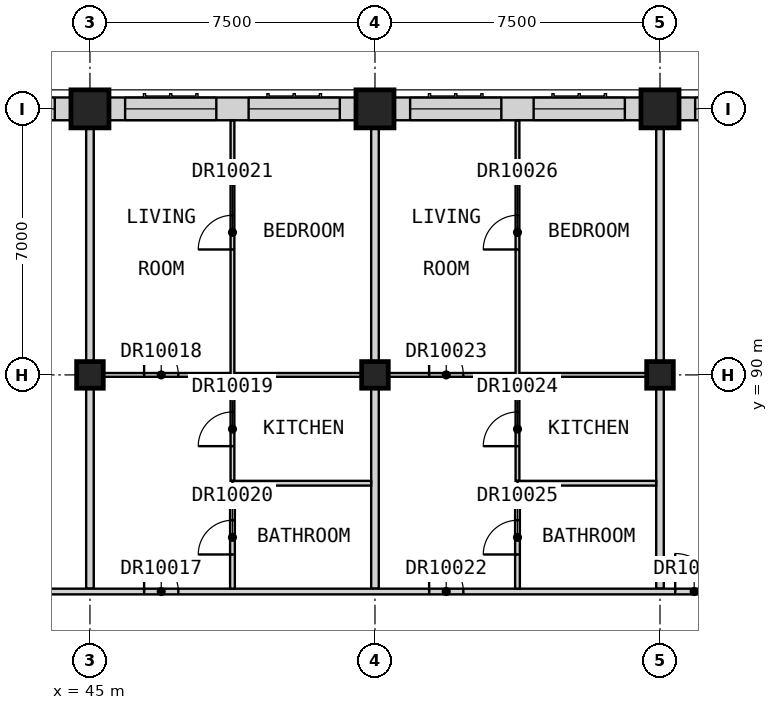
"""IFC4 building model, lengths in metres.
Left out: names, types, materials, properties, quantities, classifications, styles, units other than length and angle.
Written with IfcOpenShell. Run it as: python <this file> out.ifc"""

import sys

from ifc_helpers import new_model, si_unit, direction, frame, frame_2d, origin, origin_2d, place, context, subcontext, project, spatial, rectangle, extrude, element, fill, save


model = new_model("IFC4")
c1 = context("Model", 3, precision=1e-05, world=origin(), true_north=direction((0.0, 1.0)))
c2 = subcontext(c1, "Body", "Model", "MODEL_VIEW")
j1 = project(units=[si_unit("LENGTHUNIT", "METRE"), si_unit("PLANEANGLEUNIT", "RADIAN")], contexts=[c1])
p1 = place(None, origin())
s1 = spatial("IfcSite", under=j1, at=p1, CompositionType="ELEMENT")
p2 = place(p1, origin())
s2 = spatial("IfcBuilding", under=s1, at=p2, CompositionType="ELEMENT")
p3 = place(p2, frame((0.0, 0.0, 283.7)))
s3 = spatial("IfcBuildingStorey", under=s2, at=p3, CompositionType="ELEMENT", Elevation=283.7)
p4 = place(p3, frame((45.0, 90.0, 0.0), z_axis=(0.0, 0.0, 1.0), x_axis=(1.0, 0.0, 0.0)))
e1 = element("IfcColumn", 1, at=p4, inside=s3, PredefinedType="COLUMN", context=c2, shape_type="SweptSolid", body=[
    extrude(rectangle(XDim=0.7, YDim=0.7, at=origin_2d()), origin(), (0.0, 0.0, 1.0), 3.5),
])
p5 = place(p3, frame((45.0, 97.0, 0.0), z_axis=(0.0, 0.0, 1.0), x_axis=(1.0, 0.0, 0.0)))
e2 = element("IfcColumn", 2, at=p5, inside=s3, PredefinedType="COLUMN", context=c2, shape_type="SweptSolid", body=[
    extrude(rectangle(XDim=1.0, YDim=1.0, at=origin_2d()), origin(), (0.0, 0.0, 1.0), 3.5),
])
p6 = place(p3, frame((52.5, 90.0, 0.0), z_axis=(0.0, 0.0, 1.0), x_axis=(1.0, 0.0, 0.0)))
e3 = element("IfcColumn", 3, at=p6, inside=s3, PredefinedType="COLUMN", context=c2, shape_type="SweptSolid", body=[
    extrude(rectangle(XDim=0.7, YDim=0.7, at=origin_2d()), origin(), (0.0, 0.0, 1.0), 3.5),
])
p7 = place(p3, frame((52.5, 97.0, 0.0), z_axis=(0.0, 0.0, 1.0), x_axis=(1.0, 0.0, 0.0)))
e4 = element("IfcColumn", 4, at=p7, inside=s3, PredefinedType="COLUMN", context=c2, shape_type="SweptSolid", body=[
    extrude(rectangle(XDim=1.0, YDim=1.0, at=origin_2d()), origin(), (0.0, 0.0, 1.0), 3.5),
])
p8 = place(p3, frame((60.0, 90.0, 0.0), z_axis=(0.0, 0.0, 1.0), x_axis=(1.0, 0.0, 0.0)))
e5 = element("IfcColumn", 5, at=p8, inside=s3, PredefinedType="COLUMN", context=c2, shape_type="SweptSolid", body=[
    extrude(rectangle(XDim=0.7, YDim=0.7, at=origin_2d()), origin(), (0.0, 0.0, 1.0), 3.5),
])
p9 = place(p3, frame((60.0, 97.0, 0.0), z_axis=(0.0, 0.0, 1.0), x_axis=(1.0, 0.0, 0.0)))
e6 = element("IfcColumn", 6, at=p9, inside=s3, PredefinedType="COLUMN", context=c2, shape_type="SweptSolid", body=[
    extrude(rectangle(XDim=1.0, YDim=1.0, at=origin_2d()), origin(), (0.0, 0.0, 1.0), 3.5),
])
p10 = place(p3, frame((67.0, 97.0, 0.0), z_axis=(0.0, 0.0, 1.0), x_axis=(-1.0, 0.0, 0.0)))
e7 = element("IfcWall", 7, at=p10, inside=s3, PredefinedType="SOLIDWALL", context=c2, shape_type="SweptSolid", body=[
    extrude(rectangle(XDim=6.5, YDim=0.6, at=frame_2d((3.25, 0.0))), origin(), (0.0, 0.0, 1.0), 2.75),
])
p11 = place(p10, frame((3.675, 0.0, 0.8)))
e8 = element("IfcOpeningElement", 8, at=p11, cuts=e7, PredefinedType="OPENING", context=c2, shape_type="SweptSolid", body=[
    extrude(rectangle(XDim=2.4, YDim=1.8, at=frame_2d((1.2, 0.9))), frame((0.0, 0.31, 0.0), z_axis=(0.0, -1.0, 0.0), x_axis=(1.0, 0.0, 0.0)), (0.0, 0.0, 1.0), 0.62),
])
p12 = place(p10, frame((0.425, 0.0, 0.8)))
e9 = element("IfcOpeningElement", 9, at=p12, cuts=e7, PredefinedType="OPENING", context=c2, shape_type="SweptSolid", body=[
    extrude(rectangle(XDim=2.4, YDim=1.8, at=frame_2d((1.2, 0.9))), frame((0.0, 0.31, 0.0), z_axis=(0.0, -1.0, 0.0), x_axis=(1.0, 0.0, 0.0)), (0.0, 0.0, 1.0), 0.62),
])
p13 = place(p3, frame((59.5, 97.0, 0.0), z_axis=(0.0, 0.0, 1.0), x_axis=(-1.0, 0.0, 0.0)))
e10 = element("IfcWall", 10, at=p13, inside=s3, PredefinedType="SOLIDWALL", context=c2, shape_type="SweptSolid", body=[
    extrude(rectangle(XDim=6.5, YDim=0.6, at=frame_2d((3.25, 0.0))), origin(), (0.0, 0.0, 1.0), 2.75),
])
p14 = place(p13, frame((3.675, 0.0, 0.8)))
e11 = element("IfcOpeningElement", 11, at=p14, cuts=e10, PredefinedType="OPENING", context=c2, shape_type="SweptSolid", body=[
    extrude(rectangle(XDim=2.4, YDim=1.8, at=frame_2d((1.2, 0.9))), frame((0.0, 0.31, 0.0), z_axis=(0.0, -1.0, 0.0), x_axis=(1.0, 0.0, 0.0)), (0.0, 0.0, 1.0), 0.62),
])
p15 = place(p13, frame((0.425, 0.0, 0.8)))
e12 = element("IfcOpeningElement", 12, at=p15, cuts=e10, PredefinedType="OPENING", context=c2, shape_type="SweptSolid", body=[
    extrude(rectangle(XDim=2.4, YDim=1.8, at=frame_2d((1.2, 0.9))), frame((0.0, 0.31, 0.0), z_axis=(0.0, -1.0, 0.0), x_axis=(1.0, 0.0, 0.0)), (0.0, 0.0, 1.0), 0.62),
])
p16 = place(p3, frame((52.0, 97.0, 0.0), z_axis=(0.0, 0.0, 1.0), x_axis=(-1.0, 0.0, 0.0)))
e13 = element("IfcWall", 13, at=p16, inside=s3, PredefinedType="SOLIDWALL", context=c2, shape_type="SweptSolid", body=[
    extrude(rectangle(XDim=6.5, YDim=0.6, at=frame_2d((3.25, 0.0))), origin(), (0.0, 0.0, 1.0), 2.75),
])
p17 = place(p16, frame((3.675, 0.0, 0.8)))
e14 = element("IfcOpeningElement", 14, at=p17, cuts=e13, PredefinedType="OPENING", context=c2, shape_type="SweptSolid", body=[
    extrude(rectangle(XDim=2.4, YDim=1.8, at=frame_2d((1.2, 0.9))), frame((0.0, 0.31, 0.0), z_axis=(0.0, -1.0, 0.0), x_axis=(1.0, 0.0, 0.0)), (0.0, 0.0, 1.0), 0.62),
])
p18 = place(p16, frame((0.425, 0.0, 0.8)))
e15 = element("IfcOpeningElement", 15, at=p18, cuts=e13, PredefinedType="OPENING", context=c2, shape_type="SweptSolid", body=[
    extrude(rectangle(XDim=2.4, YDim=1.8, at=frame_2d((1.2, 0.9))), frame((0.0, 0.31, 0.0), z_axis=(0.0, -1.0, 0.0), x_axis=(1.0, 0.0, 0.0)), (0.0, 0.0, 1.0), 0.62),
])
p19 = place(p3, frame((44.5, 97.0, 0.0), z_axis=(0.0, 0.0, 1.0), x_axis=(-1.0, 0.0, 0.0)))
e16 = element("IfcWall", 16, at=p19, inside=s3, PredefinedType="SOLIDWALL", context=c2, shape_type="SweptSolid", body=[
    extrude(rectangle(XDim=6.5, YDim=0.6, at=frame_2d((3.25, 0.0))), origin(), (0.0, 0.0, 1.0), 2.75),
])
p20 = place(p19, frame((3.675, 0.0, 0.8)))
e17 = element("IfcOpeningElement", 17, at=p20, cuts=e16, PredefinedType="OPENING", context=c2, shape_type="SweptSolid", body=[
    extrude(rectangle(XDim=2.4, YDim=1.8, at=frame_2d((1.2, 0.9))), frame((0.0, 0.31, 0.0), z_axis=(0.0, -1.0, 0.0), x_axis=(1.0, 0.0, 0.0)), (0.0, 0.0, 1.0), 0.62),
])
p21 = place(p19, frame((0.425, 0.0, 0.8)))
e18 = element("IfcOpeningElement", 18, at=p21, cuts=e16, PredefinedType="OPENING", context=c2, shape_type="SweptSolid", body=[
    extrude(rectangle(XDim=2.4, YDim=1.8, at=frame_2d((1.2, 0.9))), frame((0.0, 0.31, 0.0), z_axis=(0.0, -1.0, 0.0), x_axis=(1.0, 0.0, 0.0)), (0.0, 0.0, 1.0), 0.62),
])
for number, where, z_axis, x_axis in (
    (19, (45.0, 84.375, 0.0), (0.0, 0.0, 1.0), (0.0, 1.0, 0.0)),
    (20, (52.5, 84.375, 0.0), (0.0, 0.0, 1.0), (0.0, 1.0, 0.0)),
    (21, (60.0, 84.375, 0.0), (0.0, 0.0, 1.0), (0.0, 1.0, 0.0)),
):
    element("IfcWall", number, at=place(p3, frame(where, z_axis=z_axis, x_axis=x_axis)), inside=s3, PredefinedType="PARTITIONING", context=c2, shape_type="SweptSolid", body=[
        extrude(rectangle(XDim=13.125, YDim=0.2, at=frame_2d((6.562, 0.0))), origin(), (0.0, 0.0, 1.0), 3.2),
    ])
p22 = place(p3, frame((33.75, 84.3, 0.0), z_axis=(0.0, 0.0, 1.0), x_axis=(1.0, 0.0, 0.0)))
e22 = element("IfcWall", 22, at=p22, inside=s3, PredefinedType="PARTITIONING", context=c2, shape_type="SweptSolid", body=[
    extrude(rectangle(XDim=28.05, YDim=0.15, at=frame_2d((14.025, 0.0))), origin(), (0.0, 0.0, 1.0), 3.2),
])
p23 = place(p22, frame((5.125, 0.0, 0.0)))
e23 = element("IfcOpeningElement", 23, at=p23, cuts=e22, PredefinedType="OPENING", context=c2, shape_type="SweptSolid", body=[
    extrude(rectangle(XDim=1.0, YDim=2.1, at=frame_2d((0.5, 1.05))), frame((0.0, 0.085, 0.0), z_axis=(0.0, -1.0, 0.0), x_axis=(1.0, 0.0, 0.0)), (0.0, 0.0, 1.0), 0.17),
])
p24 = place(p22, frame((12.675, 0.0, 0.0)))
e24 = element("IfcOpeningElement", 24, at=p24, cuts=e22, PredefinedType="OPENING", context=c2, shape_type="SweptSolid", body=[
    extrude(rectangle(XDim=0.9, YDim=2.1, at=frame_2d((0.45, 1.05))), frame((0.0, 0.085, 0.0), z_axis=(0.0, -1.0, 0.0), x_axis=(1.0, 0.0, 0.0)), (0.0, 0.0, 1.0), 0.17),
])
p25 = place(p22, frame((20.175, 0.0, 0.0)))
e25 = element("IfcOpeningElement", 25, at=p25, cuts=e22, PredefinedType="OPENING", context=c2, shape_type="SweptSolid", body=[
    extrude(rectangle(XDim=0.9, YDim=2.1, at=frame_2d((0.45, 1.05))), frame((0.0, 0.085, 0.0), z_axis=(0.0, -1.0, 0.0), x_axis=(1.0, 0.0, 0.0)), (0.0, 0.0, 1.0), 0.17),
])
p26 = place(p22, frame((26.65, 0.0, 0.0)))
e26 = element("IfcOpeningElement", 26, at=p26, cuts=e22, PredefinedType="OPENING", context=c2, shape_type="SweptSolid", body=[
    extrude(rectangle(XDim=1.0, YDim=2.1, at=frame_2d((0.5, 1.05))), frame((0.0, 0.085, 0.0), z_axis=(0.0, -1.0, 0.0), x_axis=(1.0, 0.0, 0.0)), (0.0, 0.0, 1.0), 0.17),
])
p27 = place(p3, frame((45.1, 90.0, 0.0), z_axis=(0.0, 0.0, 1.0), x_axis=(1.0, 0.0, 0.0)))
e27 = element("IfcWall", 27, at=p27, inside=s3, PredefinedType="PARTITIONING", context=c2, shape_type="SweptSolid", body=[
    extrude(rectangle(XDim=14.8, YDim=0.1, at=frame_2d((7.4, 0.0))), origin(), (0.0, 0.0, 1.0), 3.2),
])
p28 = place(p27, frame((1.325, 0.0, 0.0)))
e28 = element("IfcOpeningElement", 28, at=p28, cuts=e27, PredefinedType="OPENING", context=c2, shape_type="SweptSolid", body=[
    extrude(rectangle(XDim=0.9, YDim=2.1, at=frame_2d((0.45, 1.05))), frame((0.0, 0.06, 0.0), z_axis=(0.0, -1.0, 0.0), x_axis=(1.0, 0.0, 0.0)), (0.0, 0.0, 1.0), 0.12),
])
p29 = place(p27, frame((8.825, 0.0, 0.0)))
e29 = element("IfcOpeningElement", 29, at=p29, cuts=e27, PredefinedType="OPENING", context=c2, shape_type="SweptSolid", body=[
    extrude(rectangle(XDim=0.9, YDim=2.1, at=frame_2d((0.45, 1.05))), frame((0.0, 0.06, 0.0), z_axis=(0.0, -1.0, 0.0), x_axis=(1.0, 0.0, 0.0)), (0.0, 0.0, 1.0), 0.12),
])
p30 = place(p3, frame((48.75, 87.212, 0.0), z_axis=(0.0, 0.0, 1.0), x_axis=(0.0, 1.0, 0.0)))
e30 = element("IfcWall", 30, at=p30, inside=s3, PredefinedType="PARTITIONING", context=c2, shape_type="SweptSolid", body=[
    extrude(rectangle(XDim=9.478, YDim=0.1, at=frame_2d((4.739, 0.0))), origin(), (0.0, 0.0, 1.0), 3.2),
])
p31 = place(p30, frame((0.913, 0.0, 0.0)))
e31 = element("IfcOpeningElement", 31, at=p31, cuts=e30, PredefinedType="OPENING", context=c2, shape_type="SweptSolid", body=[
    extrude(rectangle(XDim=0.9, YDim=2.1, at=frame_2d((0.45, 1.05))), frame((0.0, 0.06, 0.0), z_axis=(0.0, -1.0, 0.0), x_axis=(1.0, 0.0, 0.0)), (0.0, 0.0, 1.0), 0.12),
])
p32 = place(p30, frame((6.087, 0.0, 0.0)))
e32 = element("IfcOpeningElement", 32, at=p32, cuts=e30, PredefinedType="OPENING", context=c2, shape_type="SweptSolid", body=[
    extrude(rectangle(XDim=0.9, YDim=2.1, at=frame_2d((0.45, 1.05))), frame((0.0, 0.06, 0.0), z_axis=(0.0, -1.0, 0.0), x_axis=(1.0, 0.0, 0.0)), (0.0, 0.0, 1.0), 0.12),
])
p33 = place(p3, frame((56.25, 87.212, 0.0), z_axis=(0.0, 0.0, 1.0), x_axis=(0.0, 1.0, 0.0)))
e33 = element("IfcWall", 33, at=p33, inside=s3, PredefinedType="PARTITIONING", context=c2, shape_type="SweptSolid", body=[
    extrude(rectangle(XDim=9.478, YDim=0.1, at=frame_2d((4.739, 0.0))), origin(), (0.0, 0.0, 1.0), 3.2),
])
p34 = place(p33, frame((0.913, 0.0, 0.0)))
e34 = element("IfcOpeningElement", 34, at=p34, cuts=e33, PredefinedType="OPENING", context=c2, shape_type="SweptSolid", body=[
    extrude(rectangle(XDim=0.9, YDim=2.1, at=frame_2d((0.45, 1.05))), frame((0.0, 0.06, 0.0), z_axis=(0.0, -1.0, 0.0), x_axis=(1.0, 0.0, 0.0)), (0.0, 0.0, 1.0), 0.12),
])
p35 = place(p33, frame((6.087, 0.0, 0.0)))
e35 = element("IfcOpeningElement", 35, at=p35, cuts=e33, PredefinedType="OPENING", context=c2, shape_type="SweptSolid", body=[
    extrude(rectangle(XDim=0.9, YDim=2.1, at=frame_2d((0.45, 1.05))), frame((0.0, 0.06, 0.0), z_axis=(0.0, -1.0, 0.0), x_axis=(1.0, 0.0, 0.0)), (0.0, 0.0, 1.0), 0.12),
])
for number, where, z_axis, x_axis in (
    (36, (48.75, 87.15, 0.0), (0.0, 0.0, 1.0), (1.0, 0.0, 0.0)),
    (37, (56.25, 87.15, 0.0), (0.0, 0.0, 1.0), (1.0, 0.0, 0.0)),
):
    element("IfcWall", number, at=place(p3, frame(where, z_axis=z_axis, x_axis=x_axis)), inside=s3, PredefinedType="PARTITIONING", context=c2, shape_type="SweptSolid", body=[
        extrude(rectangle(XDim=3.65, YDim=0.125, at=frame_2d((1.825, 0.0))), origin(), (0.0, 0.0, 1.0), 3.2),
    ])
p36 = place(p3, frame((48.75, 84.375, 0.0), z_axis=(0.0, 0.0, 1.0), x_axis=(0.0, 1.0, 0.0)))
e38 = element("IfcWall", 38, at=p36, inside=s3, PredefinedType="PARTITIONING", context=c2, shape_type="SweptSolid", body=[
    extrude(rectangle(XDim=2.712, YDim=0.125, at=frame_2d((1.356, 0.0))), origin(), (0.0, 0.0, 1.0), 3.2),
])
p37 = place(p36, frame((0.9, 0.0, 0.0)))
e39 = element("IfcOpeningElement", 39, at=p37, cuts=e38, PredefinedType="OPENING", context=c2, shape_type="SweptSolid", body=[
    extrude(rectangle(XDim=0.9, YDim=2.1, at=frame_2d((0.45, 1.05))), frame((0.0, 0.073, 0.0), z_axis=(0.0, -1.0, 0.0), x_axis=(1.0, 0.0, 0.0)), (0.0, 0.0, 1.0), 0.145),
])
p38 = place(p3, frame((56.25, 84.375, 0.0), z_axis=(0.0, 0.0, 1.0), x_axis=(0.0, 1.0, 0.0)))
e40 = element("IfcWall", 40, at=p38, inside=s3, PredefinedType="PARTITIONING", context=c2, shape_type="SweptSolid", body=[
    extrude(rectangle(XDim=2.712, YDim=0.125, at=frame_2d((1.356, 0.0))), origin(), (0.0, 0.0, 1.0), 3.2),
])
p39 = place(p38, frame((0.9, 0.0, 0.0)))
e41 = element("IfcOpeningElement", 41, at=p39, cuts=e40, PredefinedType="OPENING", context=c2, shape_type="SweptSolid", body=[
    extrude(rectangle(XDim=0.9, YDim=2.1, at=frame_2d((0.45, 1.05))), frame((0.0, 0.073, 0.0), z_axis=(0.0, -1.0, 0.0), x_axis=(1.0, 0.0, 0.0)), (0.0, 0.0, 1.0), 0.145),
])
p40 = place(p11, origin())
e42 = element("IfcWindow", 42, at=p40, inside=s3, PartitioningType="SINGLE_PANEL", PredefinedType="WINDOW", context=c2, shape_type="SweptSolid", body=[
    extrude(rectangle(XDim=2.4, YDim=1.8, at=frame_2d((1.2, 0.9))), frame((0.0, -0.07, 0.0), z_axis=(0.0, -1.0, 0.0), x_axis=(1.0, 0.0, 0.0)), (0.0, 0.0, 1.0), 0.06),
])
fill(e8, e42)
p41 = place(p14, origin())
e43 = element("IfcWindow", 43, at=p41, inside=s3, PartitioningType="SINGLE_PANEL", PredefinedType="WINDOW", context=c2, shape_type="SweptSolid", body=[
    extrude(rectangle(XDim=2.4, YDim=1.8, at=frame_2d((1.2, 0.9))), frame((0.0, -0.07, 0.0), z_axis=(0.0, -1.0, 0.0), x_axis=(1.0, 0.0, 0.0)), (0.0, 0.0, 1.0), 0.06),
])
fill(e11, e43)
p42 = place(p15, origin())
e44 = element("IfcWindow", 44, at=p42, inside=s3, PartitioningType="SINGLE_PANEL", PredefinedType="WINDOW", context=c2, shape_type="SweptSolid", body=[
    extrude(rectangle(XDim=2.4, YDim=1.8, at=frame_2d((1.2, 0.9))), frame((0.0, -0.07, 0.0), z_axis=(0.0, -1.0, 0.0), x_axis=(1.0, 0.0, 0.0)), (0.0, 0.0, 1.0), 0.06),
])
fill(e12, e44)
p43 = place(p17, origin())
e45 = element("IfcWindow", 45, at=p43, inside=s3, PartitioningType="SINGLE_PANEL", PredefinedType="WINDOW", context=c2, shape_type="SweptSolid", body=[
    extrude(rectangle(XDim=2.4, YDim=1.8, at=frame_2d((1.2, 0.9))), frame((0.0, -0.07, 0.0), z_axis=(0.0, -1.0, 0.0), x_axis=(1.0, 0.0, 0.0)), (0.0, 0.0, 1.0), 0.06),
])
fill(e14, e45)
p44 = place(p18, origin())
e46 = element("IfcWindow", 46, at=p44, inside=s3, PartitioningType="SINGLE_PANEL", PredefinedType="WINDOW", context=c2, shape_type="SweptSolid", body=[
    extrude(rectangle(XDim=2.4, YDim=1.8, at=frame_2d((1.2, 0.9))), frame((0.0, -0.07, 0.0), z_axis=(0.0, -1.0, 0.0), x_axis=(1.0, 0.0, 0.0)), (0.0, 0.0, 1.0), 0.06),
])
fill(e15, e46)
p45 = place(p21, origin())
e47 = element("IfcWindow", 47, at=p45, inside=s3, PartitioningType="SINGLE_PANEL", PredefinedType="WINDOW", context=c2, shape_type="SweptSolid", body=[
    extrude(rectangle(XDim=2.4, YDim=1.8, at=frame_2d((1.2, 0.9))), frame((0.0, -0.07, 0.0), z_axis=(0.0, -1.0, 0.0), x_axis=(1.0, 0.0, 0.0)), (0.0, 0.0, 1.0), 0.06),
])
fill(e18, e47)
p46 = place(p24, origin())
e48 = element("IfcDoor", 48, at=p46, inside=s3, OperationType="SINGLE_SWING_LEFT", PredefinedType="DOOR", context=c2, shape_type="SweptSolid", body=[
    extrude(rectangle(XDim=0.9, YDim=2.1, at=frame_2d((0.45, 1.05))), frame((0.0, 0.025, 0.0), z_axis=(0.0, -1.0, 0.0), x_axis=(1.0, 0.0, 0.0)), (0.0, 0.0, 1.0), 0.05),
])
fill(e24, e48)
p47 = place(p28, origin())
e49 = element("IfcDoor", 49, at=p47, inside=s3, OperationType="SINGLE_SWING_RIGHT", PredefinedType="DOOR", context=c2, shape_type="SweptSolid", body=[
    extrude(rectangle(XDim=0.9, YDim=2.1, at=frame_2d((0.45, 1.05))), frame((0.0, 0.025, 0.0), z_axis=(0.0, -1.0, 0.0), x_axis=(1.0, 0.0, 0.0)), (0.0, 0.0, 1.0), 0.05),
])
fill(e28, e49)
p48 = place(p31, origin())
e50 = element("IfcDoor", 50, at=p48, inside=s3, OperationType="SINGLE_SWING_LEFT", PredefinedType="DOOR", context=c2, shape_type="SweptSolid", body=[
    extrude(rectangle(XDim=0.9, YDim=2.1, at=frame_2d((0.45, 1.05))), frame((0.0, 0.025, 0.0), z_axis=(0.0, -1.0, 0.0), x_axis=(1.0, 0.0, 0.0)), (0.0, 0.0, 1.0), 0.05),
])
fill(e31, e50)
p49 = place(p37, origin())
e51 = element("IfcDoor", 51, at=p49, inside=s3, OperationType="SINGLE_SWING_RIGHT", PredefinedType="DOOR", context=c2, shape_type="SweptSolid", body=[
    extrude(rectangle(XDim=0.9, YDim=2.1, at=frame_2d((0.45, 1.05))), frame((0.0, 0.025, 0.0), z_axis=(0.0, -1.0, 0.0), x_axis=(1.0, 0.0, 0.0)), (0.0, 0.0, 1.0), 0.05),
])
fill(e39, e51)
p50 = place(p32, origin())
e52 = element("IfcDoor", 52, at=p50, inside=s3, OperationType="SINGLE_SWING_LEFT", PredefinedType="DOOR", context=c2, shape_type="SweptSolid", body=[
    extrude(rectangle(XDim=0.9, YDim=2.1, at=frame_2d((0.45, 1.05))), frame((0.0, 0.025, 0.0), z_axis=(0.0, -1.0, 0.0), x_axis=(1.0, 0.0, 0.0)), (0.0, 0.0, 1.0), 0.05),
])
fill(e32, e52)
p51 = place(p25, origin())
e53 = element("IfcDoor", 53, at=p51, inside=s3, OperationType="SINGLE_SWING_LEFT", PredefinedType="DOOR", context=c2, shape_type="SweptSolid", body=[
    extrude(rectangle(XDim=0.9, YDim=2.1, at=frame_2d((0.45, 1.05))), frame((0.0, 0.025, 0.0), z_axis=(0.0, -1.0, 0.0), x_axis=(1.0, 0.0, 0.0)), (0.0, 0.0, 1.0), 0.05),
])
fill(e25, e53)
p52 = place(p29, origin())
e54 = element("IfcDoor", 54, at=p52, inside=s3, OperationType="SINGLE_SWING_RIGHT", PredefinedType="DOOR", context=c2, shape_type="SweptSolid", body=[
    extrude(rectangle(XDim=0.9, YDim=2.1, at=frame_2d((0.45, 1.05))), frame((0.0, 0.025, 0.0), z_axis=(0.0, -1.0, 0.0), x_axis=(1.0, 0.0, 0.0)), (0.0, 0.0, 1.0), 0.05),
])
fill(e29, e54)
p53 = place(p34, origin())
e55 = element("IfcDoor", 55, at=p53, inside=s3, OperationType="SINGLE_SWING_LEFT", PredefinedType="DOOR", context=c2, shape_type="SweptSolid", body=[
    extrude(rectangle(XDim=0.9, YDim=2.1, at=frame_2d((0.45, 1.05))), frame((0.0, 0.025, 0.0), z_axis=(0.0, -1.0, 0.0), x_axis=(1.0, 0.0, 0.0)), (0.0, 0.0, 1.0), 0.05),
])
fill(e34, e55)
p54 = place(p39, origin())
e56 = element("IfcDoor", 56, at=p54, inside=s3, OperationType="SINGLE_SWING_RIGHT", PredefinedType="DOOR", context=c2, shape_type="SweptSolid", body=[
    extrude(rectangle(XDim=0.9, YDim=2.1, at=frame_2d((0.45, 1.05))), frame((0.0, 0.025, 0.0), z_axis=(0.0, -1.0, 0.0), x_axis=(1.0, 0.0, 0.0)), (0.0, 0.0, 1.0), 0.05),
])
fill(e41, e56)
p55 = place(p35, origin())
e57 = element("IfcDoor", 57, at=p55, inside=s3, OperationType="SINGLE_SWING_LEFT", PredefinedType="DOOR", context=c2, shape_type="SweptSolid", body=[
    extrude(rectangle(XDim=0.9, YDim=2.1, at=frame_2d((0.45, 1.05))), frame((0.0, 0.025, 0.0), z_axis=(0.0, -1.0, 0.0), x_axis=(1.0, 0.0, 0.0)), (0.0, 0.0, 1.0), 0.05),
])
fill(e35, e57)
p56 = place(p26, origin())
e58 = element("IfcDoor", 58, at=p56, inside=s3, OperationType="SINGLE_SWING_LEFT", PredefinedType="DOOR", context=c2, shape_type="SweptSolid", body=[
    extrude(rectangle(XDim=1.0, YDim=2.1, at=frame_2d((0.5, 1.05))), frame((0.0, 0.025, 0.0), z_axis=(0.0, -1.0, 0.0), x_axis=(1.0, 0.0, 0.0)), (0.0, 0.0, 1.0), 0.05),
])
fill(e26, e58)
save(model, sys.argv[1])
